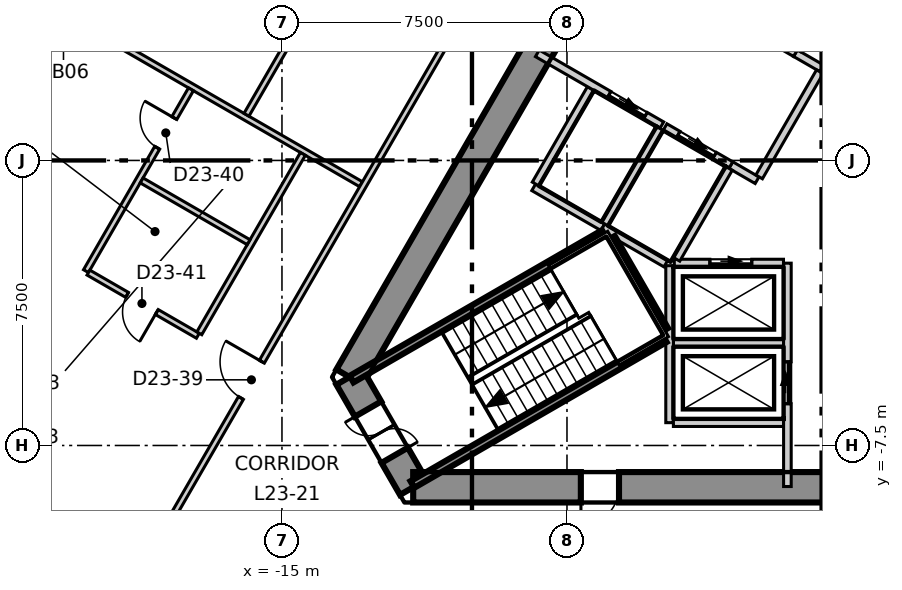
"""IFC4 building model, lengths in metres.
Left out: names, types, materials, properties, quantities, classifications, styles, units other than length and angle.
Written with IfcOpenShell. Run it as: python <this file> out.ifc"""

import sys

from ifc_helpers import new_model, si_unit, direction, frame, frame_2d, origin, place, context, subcontext, project, spatial, polyline, rectangle, outline, extrude, element, fill, save


model = new_model("IFC4")
c1 = context("Model", 3, precision=1e-05, world=origin(), true_north=direction((0.0, 1.0)))
c2 = subcontext(c1, "Body", "Model", "MODEL_VIEW")
j1 = project(units=[si_unit("LENGTHUNIT", "METRE"), si_unit("PLANEANGLEUNIT", "RADIAN")], contexts=[c1])
p1 = place(None, origin())
s1 = spatial("IfcSite", under=j1, at=p1, CompositionType="ELEMENT")
p2 = place(p1, origin())
s2 = spatial("IfcBuilding", under=s1, at=p2, CompositionType="ELEMENT")
p3 = place(p2, frame((0.0, 0.0, 104.3)))
s3 = spatial("IfcBuildingStorey", under=s2, at=p3, CompositionType="ELEMENT", Elevation=104.3)
p4 = place(p3, frame((-1.674, 14.3, -0.3), z_axis=(0.0, 0.0, 1.0), x_axis=(-0.499995765644, -0.866027848477, 0.0)))
e1 = element("IfcWall", 1, at=p4, inside=s3, PredefinedType="SHEAR", context=c2, shape_type="SweptSolid", body=[
    extrude(outline(polyline([(-0.231, -0.4), (1.732, -0.4), (3.695, -0.4), (5.658, -0.4), (7.621, -0.4), (9.584, -0.4), (11.547, -0.4), (13.51, -0.4), (15.473, -0.4), (17.436, -0.4), (19.399, -0.4), (21.362, -0.4), (23.325, -0.4), (22.863, 0.4), (20.977, 0.4), (19.091, 0.4), (17.205, 0.4), (15.319, 0.4), (13.433, 0.4), (11.547, 0.4), (9.661, 0.4), (7.775, 0.4), (5.889, 0.4), (4.003, 0.4), (2.117, 0.4), (0.231, 0.4), (-0.231, -0.4)])), origin(), (0.0, 0.0, 1.0), 4.0),
])
p5 = place(p4, frame((10.997, 0.0, 0.3)))
e2 = element("IfcOpeningElement", 2, at=p5, cuts=e1, PredefinedType="OPENING", context=c2, shape_type="SweptSolid", body=[
    extrude(rectangle(XDim=1.1, YDim=2.1, at=frame_2d((0.55, 1.05))), frame((0.0, 0.41, 0.0), z_axis=(0.0, -1.0, 0.0), x_axis=(1.0, 0.0, 0.0)), (0.0, 0.0, 1.0), 0.82),
])
p6 = place(p4, frame((4.474, 0.0, 0.3)))
e3 = element("IfcOpeningElement", 3, at=p6, cuts=e1, PredefinedType="OPENING", context=c2, shape_type="SweptSolid", body=[
    extrude(rectangle(XDim=0.9, YDim=2.1, at=frame_2d((0.45, 1.05))), frame((0.0, 0.41, 0.0), z_axis=(0.0, -1.0, 0.0), x_axis=(1.0, 0.0, 0.0)), (0.0, 0.0, 1.0), 0.82),
])
p7 = place(p3, frame((-13.221, -5.7, -0.3), z_axis=(0.0, 0.0, 1.0), x_axis=(0.49987182685, -0.866099391942, 0.0)))
e4 = element("IfcWall", 4, at=p7, inside=s3, PredefinedType="SHEAR", context=c2, shape_type="SweptSolid", body=[
    extrude(outline(polyline([(-0.231, -0.4), (1.674, -0.4), (3.579, -0.4), (3.118, 0.4), (1.674, 0.4), (0.231, 0.4), (-0.231, -0.4)])), origin(), (0.0, 0.0, 1.0), 4.0),
])
p8 = place(p7, frame((0.974, 0.0, 0.3)))
e5 = element("IfcOpeningElement", 5, at=p8, cuts=e4, PredefinedType="OPENING", context=c2, shape_type="SweptSolid", body=[
    extrude(rectangle(XDim=1.4, YDim=2.1, at=frame_2d((0.7, 1.05))), frame((0.0, 0.41, 0.0), z_axis=(0.0, -1.0, 0.0), x_axis=(1.0, 0.0, 0.0)), (0.0, 0.0, 1.0), 0.82),
])
p9 = place(p3, frame((-11.547, -8.6, -0.3), z_axis=(0.0, 0.0, 1.0), x_axis=(1.0, 0.0, 0.0)))
e6 = element("IfcWall", 6, at=p9, inside=s3, PredefinedType="SHEAR", context=c2, shape_type="SweptSolid", body=[
    extrude(outline(polyline([(-0.231, -0.4), (1.732, -0.4), (3.695, -0.4), (5.658, -0.4), (7.621, -0.4), (9.584, -0.4), (11.547, -0.4), (13.51, -0.4), (15.473, -0.4), (17.436, -0.4), (19.399, -0.4), (21.362, -0.4), (23.325, -0.4), (22.863, 0.4), (20.977, 0.4), (19.091, 0.4), (17.205, 0.4), (15.319, 0.4), (13.433, 0.4), (11.547, 0.4), (9.661, 0.4), (7.775, 0.4), (5.889, 0.4), (4.003, 0.4), (2.117, 0.4), (0.231, 0.4), (-0.231, -0.4)])), origin(), (0.0, 0.0, 1.0), 4.0),
])
p10 = place(p9, frame((4.414, 0.0, 0.3)))
e7 = element("IfcOpeningElement", 7, at=p10, cuts=e6, PredefinedType="OPENING", context=c2, shape_type="SweptSolid", body=[
    extrude(rectangle(XDim=1.0, YDim=2.1, at=frame_2d((0.5, 1.05))), frame((0.0, 0.41, 0.0), z_axis=(0.0, -1.0, 0.0), x_axis=(1.0, 0.0, 0.0)), (0.0, 0.0, 1.0), 0.82),
])
p11 = place(p3, frame((-3.2, 35.691, 0.0), z_axis=(0.0, 0.0, 1.0), x_axis=(-0.500010127185, -0.866019556773, 0.0)))
e8 = element("IfcWall", 8, at=p11, inside=s3, PredefinedType="ELEMENTEDWALL", context=c2, shape_type="SweptSolid", body=[
    extrude(rectangle(XDim=58.599, YDim=0.2, at=frame_2d((29.299, 0.0))), origin(), (0.0, 0.0, 1.0), 3.7),
])
p12 = place(p11, frame((2.353, 0.0, 0.9)))
e9 = element("IfcOpeningElement", 9, at=p12, cuts=e8, PredefinedType="OPENING", context=c2, shape_type="SweptSolid", body=[
    extrude(rectangle(XDim=4.9, YDim=2.5, at=frame_2d((2.45, 1.25))), frame((0.0, 0.11, 0.0), z_axis=(0.0, -1.0, 0.0), x_axis=(1.0, 0.0, 0.0)), (0.0, 0.0, 1.0), 0.22),
])
p13 = place(p11, frame((9.355, 0.0, 0.9)))
e10 = element("IfcOpeningElement", 10, at=p13, cuts=e8, PredefinedType="OPENING", context=c2, shape_type="SweptSolid", body=[
    extrude(rectangle(XDim=4.9, YDim=2.5, at=frame_2d((2.45, 1.25))), frame((0.0, 0.11, 0.0), z_axis=(0.0, -1.0, 0.0), x_axis=(1.0, 0.0, 0.0)), (0.0, 0.0, 1.0), 0.22),
])
p14 = place(p11, frame((16.357, 0.0, 0.9)))
e11 = element("IfcOpeningElement", 11, at=p14, cuts=e8, PredefinedType="OPENING", context=c2, shape_type="SweptSolid", body=[
    extrude(rectangle(XDim=4.9, YDim=2.5, at=frame_2d((2.45, 1.25))), frame((0.0, 0.11, 0.0), z_axis=(0.0, -1.0, 0.0), x_axis=(1.0, 0.0, 0.0)), (0.0, 0.0, 1.0), 0.22),
])
p15 = place(p11, frame((23.358, 0.0, 0.9)))
e12 = element("IfcOpeningElement", 12, at=p15, cuts=e8, PredefinedType="OPENING", context=c2, shape_type="SweptSolid", body=[
    extrude(rectangle(XDim=4.9, YDim=2.5, at=frame_2d((2.45, 1.25))), frame((0.0, 0.11, 0.0), z_axis=(0.0, -1.0, 0.0), x_axis=(1.0, 0.0, 0.0)), (0.0, 0.0, 1.0), 0.22),
])
p16 = place(p11, frame((30.36, 0.0, 0.9)))
e13 = element("IfcOpeningElement", 13, at=p16, cuts=e8, PredefinedType="OPENING", context=c2, shape_type="SweptSolid", body=[
    extrude(rectangle(XDim=4.9, YDim=2.5, at=frame_2d((2.45, 1.25))), frame((0.0, 0.11, 0.0), z_axis=(0.0, -1.0, 0.0), x_axis=(1.0, 0.0, 0.0)), (0.0, 0.0, 1.0), 0.22),
])
p17 = place(p11, frame((37.362, 0.0, 0.9)))
e14 = element("IfcOpeningElement", 14, at=p17, cuts=e8, PredefinedType="OPENING", context=c2, shape_type="SweptSolid", body=[
    extrude(rectangle(XDim=4.9, YDim=2.5, at=frame_2d((2.45, 1.25))), frame((0.0, 0.11, 0.0), z_axis=(0.0, -1.0, 0.0), x_axis=(1.0, 0.0, 0.0)), (0.0, 0.0, 1.0), 0.22),
])
p18 = place(p11, frame((44.363, 0.0, 0.9)))
e15 = element("IfcOpeningElement", 15, at=p18, cuts=e8, PredefinedType="OPENING", context=c2, shape_type="SweptSolid", body=[
    extrude(rectangle(XDim=4.9, YDim=2.5, at=frame_2d((2.45, 1.25))), frame((0.0, 0.11, 0.0), z_axis=(0.0, -1.0, 0.0), x_axis=(1.0, 0.0, 0.0)), (0.0, 0.0, 1.0), 0.22),
])
p19 = place(p11, frame((51.365, 0.0, 0.9)))
e16 = element("IfcOpeningElement", 16, at=p19, cuts=e8, PredefinedType="OPENING", context=c2, shape_type="SweptSolid", body=[
    extrude(rectangle(XDim=4.9, YDim=2.5, at=frame_2d((2.45, 1.25))), frame((0.0, 0.11, 0.0), z_axis=(0.0, -1.0, 0.0), x_axis=(1.0, 0.0, 0.0)), (0.0, 0.0, 1.0), 0.22),
])
p20 = place(p3, frame((-21.286, 4.205, 0.0), z_axis=(0.0, 0.0, 1.0), x_axis=(0.866007579589, -0.500030871142, 0.0)))
e17 = element("IfcWall", 17, at=p20, inside=s3, PredefinedType="PARTITIONING", context=c2, shape_type="SweptSolid", body=[
    extrude(rectangle(XDim=9.662, YDim=0.15, at=frame_2d((4.831, 0.0))), origin(), (0.0, 0.0, 1.0), 3.7),
])
p21 = place(p3, frame((-18.631, -10.669, 0.0), z_axis=(0.0, 0.0, 1.0), x_axis=(0.500015596868, 0.866016398741, 0.0)))
e18 = element("IfcWall", 18, at=p21, inside=s3, PredefinedType="PARTITIONING", context=c2, shape_type="SweptSolid", body=[
    extrude(rectangle(XDim=24.656, YDim=0.15, at=frame_2d((12.328, 0.0))), origin(), (0.0, 0.0, 1.0), 3.7),
])
p22 = place(p21, frame((17.507, 0.0, 0.0)))
e19 = element("IfcOpeningElement", 19, at=p22, cuts=e18, PredefinedType="OPENING", context=c2, shape_type="SweptSolid", body=[
    extrude(rectangle(XDim=1.1, YDim=2.1, at=frame_2d((0.55, 1.05))), frame((0.0, 0.085, 0.0), z_axis=(0.0, -1.0, 0.0), x_axis=(1.0, 0.0, 0.0)), (0.0, 0.0, 1.0), 0.17),
])
p23 = place(p21, frame((5.104, 0.0, 0.0)))
e20 = element("IfcOpeningElement", 20, at=p23, cuts=e18, PredefinedType="OPENING", context=c2, shape_type="SweptSolid", body=[
    extrude(rectangle(XDim=1.1, YDim=2.1, at=frame_2d((0.55, 1.05))), frame((0.0, 0.085, 0.0), z_axis=(0.0, -1.0, 0.0), x_axis=(1.0, 0.0, 0.0)), (0.0, 0.0, 1.0), 0.17),
])
p24 = place(p3, frame((-20.157, -2.913, 0.0), z_axis=(0.0, 0.0, 1.0), x_axis=(0.499898410332, 0.866084048662, 0.0)))
e21 = element("IfcWall", 21, at=p24, inside=s3, PredefinedType="PARTITIONING", context=c2, shape_type="SweptSolid", body=[
    extrude(rectangle(XDim=5.525, YDim=0.15, at=frame_2d((2.763, 0.0))), origin(), (0.0, 0.0, 1.0), 3.7),
])
p25 = place(p24, frame((3.75, 0.0, 0.0)))
e22 = element("IfcOpeningElement", 22, at=p25, cuts=e21, PredefinedType="OPENING", context=c2, shape_type="SweptSolid", body=[
    extrude(rectangle(XDim=0.9, YDim=2.1, at=frame_2d((0.45, 1.05))), frame((0.0, 0.085, 0.0), z_axis=(0.0, -1.0, 0.0), x_axis=(1.0, 0.0, 0.0)), (0.0, 0.0, 1.0), 0.17),
])
p26 = place(p3, frame((-20.092, -2.951, 0.0), z_axis=(0.0, 0.0, 1.0), x_axis=(0.866047399325, -0.49996190067, 0.0)))
e23 = element("IfcWall", 23, at=p26, inside=s3, PredefinedType="PARTITIONING", context=c2, shape_type="SweptSolid", body=[
    extrude(rectangle(XDim=3.324, YDim=0.15, at=frame_2d((1.662, 0.0))), origin(), (0.0, 0.0, 1.0), 3.7),
])
p27 = place(p26, frame((1.175, 0.0, 0.0)))
e24 = element("IfcOpeningElement", 24, at=p27, cuts=e23, PredefinedType="OPENING", context=c2, shape_type="SweptSolid", body=[
    extrude(rectangle(XDim=0.9, YDim=2.1, at=frame_2d((0.45, 1.05))), frame((0.0, 0.085, 0.0), z_axis=(0.0, -1.0, 0.0), x_axis=(1.0, 0.0, 0.0)), (0.0, 0.0, 1.0), 0.17),
])
p28 = place(p3, frame((-17.175, -4.548, 0.0), z_axis=(0.0, 0.0, 1.0), x_axis=(0.499983534837, 0.866034909742, 0.0)))
e25 = element("IfcWall", 25, at=p28, inside=s3, PredefinedType="PARTITIONING", context=c2, shape_type="SweptSolid", body=[
    extrude(rectangle(XDim=5.45, YDim=0.15, at=frame_2d((2.725, 0.0))), origin(), (0.0, 0.0, 1.0), 3.7),
])
p29 = place(p3, frame((-18.692, -0.526, 0.0), z_axis=(0.0, 0.0, 1.0), x_axis=(0.865977875238, -0.500082312822, 0.0)))
e26 = element("IfcWall", 26, at=p29, inside=s3, PredefinedType="PARTITIONING", context=c2, shape_type="SweptSolid", body=[
    extrude(rectangle(XDim=3.25, YDim=0.15, at=frame_2d((1.625, 0.0))), origin(), (0.0, 0.0, 1.0), 3.7),
])
p30 = place(p3, frame((-15.934, 1.202, 0.0), z_axis=(0.0, 0.0, 1.0), x_axis=(0.499994937304, 0.866028326714, 0.0)))
e27 = element("IfcWall", 27, at=p30, inside=s3, PredefinedType="PARTITIONING", context=c2, shape_type="SweptSolid", body=[
    extrude(rectangle(XDim=12.952, YDim=0.15, at=frame_2d((6.476, 0.0))), origin(), (0.0, 0.0, 1.0), 3.7),
])
p31 = place(p30, frame((5.977, 0.0, 0.0)))
e28 = element("IfcOpeningElement", 28, at=p31, cuts=e27, PredefinedType="OPENING", context=c2, shape_type="SweptSolid", body=[
    extrude(rectangle(XDim=1.0, YDim=2.1, at=frame_2d((0.5, 1.05))), frame((0.0, 0.085, 0.0), z_axis=(0.0, -1.0, 0.0), x_axis=(1.0, 0.0, 0.0)), (0.0, 0.0, 1.0), 0.17),
])
p32 = place(p3, frame((-8.376, -0.707, 0.0), z_axis=(0.0, 0.0, 1.0), x_axis=(0.866067520717, -0.499927044236, 0.0)))
e29 = element("IfcWall", 29, at=p32, inside=s3, PredefinedType="SOLIDWALL", context=c2, shape_type="SweptSolid", body=[
    extrude(rectangle(XDim=2.1, YDim=0.2, at=frame_2d((1.05, 0.0))), origin(), (0.0, 0.0, 1.0), 3.7),
])
p33 = place(p3, frame((-8.326, -0.62, 0.0), z_axis=(0.0, 0.0, 1.0), x_axis=(0.500023687443, 0.866011727401, 0.0)))
e30 = element("IfcWall", 30, at=p33, inside=s3, PredefinedType="SOLIDWALL", context=c2, shape_type="SweptSolid", body=[
    extrude(rectangle(XDim=2.9, YDim=0.2, at=frame_2d((1.45, 0.0))), origin(), (0.0, 0.0, 1.0), 3.7),
])
p34 = place(p3, frame((-4.7, -4.8, 0.0), z_axis=(0.0, 0.0, 1.0), x_axis=(1.0, 0.0, 0.0)))
e31 = element("IfcWall", 31, at=p34, inside=s3, PredefinedType="SOLIDWALL", context=c2, shape_type="SweptSolid", body=[
    extrude(rectangle(XDim=2.9, YDim=0.2, at=frame_2d((1.45, 0.0))), origin(), (0.0, 0.0, 1.0), 3.7),
])
p35 = place(p3, frame((-4.8, -6.9, 0.0), z_axis=(0.0, 0.0, 1.0), x_axis=(0.0, 1.0, 0.0)))
e32 = element("IfcWall", 32, at=p35, inside=s3, PredefinedType="SOLIDWALL", context=c2, shape_type="SweptSolid", body=[
    extrude(rectangle(XDim=4.131, YDim=0.2, at=frame_2d((2.065, 0.0))), origin(), (0.0, 0.0, 1.0), 3.7),
])
p36 = place(p3, frame((-4.7, -6.9, 0.0), z_axis=(0.0, 0.0, 1.0), x_axis=(1.0, 0.0, 0.0)))
e33 = element("IfcWall", 33, at=p36, inside=s3, PredefinedType="SOLIDWALL", context=c2, shape_type="SweptSolid", body=[
    extrude(rectangle(XDim=2.9, YDim=0.2, at=frame_2d((1.45, 0.0))), origin(), (0.0, 0.0, 1.0), 3.7),
])
p37 = place(p3, frame((-1.7, -8.58, 0.0), z_axis=(0.0, 0.0, 1.0), x_axis=(0.0, 1.0, 0.0)))
e34 = element("IfcWall", 34, at=p37, inside=s3, PredefinedType="SOLIDWALL", context=c2, shape_type="SweptSolid", body=[
    extrude(rectangle(XDim=5.877, YDim=0.2, at=frame_2d((2.938, 0.0))), origin(), (0.0, 0.0, 1.0), 3.7),
])
p38 = place(p37, frame((2.18, 0.0, 0.0)))
e35 = element("IfcOpeningElement", 35, at=p38, cuts=e34, PredefinedType="OPENING", context=c2, shape_type="SweptSolid", body=[
    extrude(rectangle(XDim=1.1, YDim=2.1, at=frame_2d((0.55, 1.05))), frame((0.0, 0.11, 0.0), z_axis=(0.0, -1.0, 0.0), x_axis=(1.0, 0.0, 0.0)), (0.0, 0.0, 1.0), 0.22),
])
p39 = place(p3, frame((-4.676, -2.7, 0.0), z_axis=(0.0, 0.0, 1.0), x_axis=(1.0, 0.0, 0.0)))
e36 = element("IfcWall", 36, at=p39, inside=s3, PredefinedType="SOLIDWALL", context=c2, shape_type="SweptSolid", body=[
    extrude(rectangle(XDim=2.873, YDim=0.2, at=frame_2d((1.437, 0.0))), origin(), (0.0, 0.0, 1.0), 3.7),
])
p40 = place(p39, frame((0.937, 0.0, 0.0)))
e37 = element("IfcOpeningElement", 37, at=p40, cuts=e36, PredefinedType="OPENING", context=c2, shape_type="SweptSolid", body=[
    extrude(rectangle(XDim=1.1, YDim=2.1, at=frame_2d((0.55, 1.05))), frame((0.0, 0.11, 0.0), z_axis=(0.0, -1.0, 0.0), x_axis=(1.0, 0.0, 0.0)), (0.0, 0.0, 1.0), 0.22),
])
p41 = place(p3, frame((-8.28, 2.818, 0.0), z_axis=(0.0, 0.0, 1.0), x_axis=(0.86600175068, -0.50004096614, 0.0)))
e38 = element("IfcWall", 38, at=p41, inside=s3, PredefinedType="SOLIDWALL", context=c2, shape_type="SweptSolid", body=[
    extrude(rectangle(XDim=3.782, YDim=0.2, at=frame_2d((1.891, 0.0))), origin(), (0.0, 0.0, 1.0), 3.7),
])
p42 = place(p41, frame((2.18, 0.0, 0.0)))
e39 = element("IfcOpeningElement", 39, at=p42, cuts=e38, PredefinedType="OPENING", context=c2, shape_type="SweptSolid", body=[
    extrude(rectangle(XDim=1.1, YDim=2.1, at=frame_2d((0.55, 1.05))), frame((0.0, 0.11, 0.0), z_axis=(0.0, -1.0, 0.0), x_axis=(1.0, 0.0, 0.0)), (0.0, 0.0, 1.0), 0.22),
])
p43 = place(p3, frame((-3.188, -0.122, 0.0), z_axis=(0.0, 0.0, 1.0), x_axis=(0.865705793592, -0.50055317294, 0.0)))
e40 = element("IfcWall", 40, at=p43, inside=s3, PredefinedType="SOLIDWALL", context=c2, shape_type="SweptSolid", body=[
    extrude(rectangle(XDim=0.797, YDim=0.2, at=frame_2d((0.398, 0.0))), origin(), (0.0, 0.0, 1.0), 3.7),
])
p44 = place(p3, frame((-1.488, 2.822, 0.0), z_axis=(0.0, 0.0, 1.0), x_axis=(0.866236612152, -0.499633997809, 0.0)))
e41 = element("IfcWall", 41, at=p44, inside=s3, PredefinedType="SOLIDWALL", context=c2, shape_type="SweptSolid", body=[
    extrude(rectangle(XDim=0.796, YDim=0.2, at=frame_2d((0.398, 0.0))), origin(), (0.0, 0.0, 1.0), 3.7),
])
p45 = place(p3, frame((-2.444, -0.433, 0.0), z_axis=(0.0, 0.0, 1.0), x_axis=(0.500035624827, 0.866004834804, 0.0)))
e42 = element("IfcWall", 42, at=p45, inside=s3, PredefinedType="SOLIDWALL", context=c2, shape_type="SweptSolid", body=[
    extrude(rectangle(XDim=3.194, YDim=0.2, at=frame_2d((1.597, 0.0))), origin(), (0.0, 0.0, 1.0), 3.7),
])
p46 = place(p3, frame((-6.557, -1.757, 0.0), z_axis=(0.0, 0.0, 1.0), x_axis=(0.8659754619, -0.500086491905, 0.0)))
e43 = element("IfcWall", 43, at=p46, inside=s3, PredefinedType="SOLIDWALL", context=c2, shape_type="SweptSolid", body=[
    extrude(rectangle(XDim=1.916, YDim=0.2, at=frame_2d((0.958, 0.0))), origin(), (0.0, 0.0, 1.0), 3.7),
])
p47 = place(p3, frame((-6.507, -1.67, 0.0), z_axis=(0.0, 0.0, 1.0), x_axis=(0.50012328804, 0.865954211699, 0.0)))
e44 = element("IfcWall", 44, at=p47, inside=s3, PredefinedType="SOLIDWALL", context=c2, shape_type="SweptSolid", body=[
    extrude(rectangle(XDim=2.9, YDim=0.2, at=frame_2d((1.45, 0.0))), origin(), (0.0, 0.0, 1.0), 3.7),
])
p48 = place(p3, frame((-4.92, 0.878, 0.0), z_axis=(0.0, 0.0, 1.0), x_axis=(0.866010750942, -0.50002537861, 0.0)))
e45 = element("IfcWall", 45, at=p48, inside=s3, PredefinedType="SOLIDWALL", context=c2, shape_type="SweptSolid", body=[
    extrude(rectangle(XDim=2.0, YDim=0.2, at=frame_2d((1.0, 0.0))), origin(), (0.0, 0.0, 1.0), 3.7),
])
p49 = place(p48, frame((0.4, 0.0, 0.0)))
e46 = element("IfcOpeningElement", 46, at=p49, cuts=e45, PredefinedType="OPENING", context=c2, shape_type="SweptSolid", body=[
    extrude(rectangle(XDim=1.1, YDim=2.1, at=frame_2d((0.55, 1.05))), frame((0.0, 0.11, 0.0), z_axis=(0.0, -1.0, 0.0), x_axis=(1.0, 0.0, 0.0)), (0.0, 0.0, 1.0), 0.22),
])
p50 = place(p3, frame((-4.619, -2.6, 0.0), z_axis=(0.0, 0.0, 1.0), x_axis=(0.50009492287, 0.865970593103, 0.0)))
e47 = element("IfcWall", 47, at=p50, inside=s3, PredefinedType="SOLIDWALL", context=c2, shape_type="SweptSolid", body=[
    extrude(rectangle(XDim=2.761, YDim=0.2, at=frame_2d((1.381, 0.0))), origin(), (0.0, 0.0, 1.0), 3.7),
])
p51 = place(p3, frame((-3.309, 3.873, 0.0), z_axis=(0.0, 0.0, 1.0), x_axis=(0.866098583652, -0.499873227325, 0.0)))
e48 = element("IfcWall", 48, at=p51, inside=s3, PredefinedType="SOLIDWALL", context=c2, shape_type="SweptSolid", body=[
    extrude(rectangle(XDim=2.103, YDim=0.2, at=frame_2d((1.051, 0.0))), origin(), (0.0, 0.0, 1.0), 3.7),
])
p52 = place(p51, frame((0.502, 0.0, 0.0)))
e49 = element("IfcOpeningElement", 49, at=p52, cuts=e48, PredefinedType="OPENING", context=c2, shape_type="SweptSolid", body=[
    extrude(rectangle(XDim=1.1, YDim=2.1, at=frame_2d((0.55, 1.05))), frame((0.0, 0.11, 0.0), z_axis=(0.0, -1.0, 0.0), x_axis=(1.0, 0.0, 0.0)), (0.0, 0.0, 1.0), 0.22),
])
p53 = place(p3, frame((-13.167, -5.754, 0.0), z_axis=(0.0, 0.0, 1.0), x_axis=(0.866060938598, 0.499938446846, 0.0)))
e50 = element("IfcWall", 50, at=p53, inside=s3, PredefinedType="SOLIDWALL", context=c2, shape_type="SweptSolid", body=[
    extrude(rectangle(XDim=7.665, YDim=0.2, at=frame_2d((3.832, 0.0))), origin(), (0.0, 0.0, 1.0), 3.7),
])
p54 = place(p3, frame((-6.329, -2.038, 0.0), z_axis=(0.0, 0.0, 1.0), x_axis=(0.500200581029, -0.865909567298, 0.0)))
e51 = element("IfcWall", 51, at=p54, inside=s3, PredefinedType="SOLIDWALL", context=c2, shape_type="SweptSolid", body=[
    extrude(rectangle(XDim=2.799, YDim=0.2, at=frame_2d((1.399, 0.0))), origin(), (0.0, 0.0, 1.0), 3.7),
])
p55 = place(p3, frame((-11.567, -8.526, 0.0), z_axis=(0.0, 0.0, 1.0), x_axis=(0.866005769735, 0.50003400563, 0.0)))
e52 = element("IfcWall", 52, at=p55, inside=s3, PredefinedType="SOLIDWALL", context=c2, shape_type="SweptSolid", body=[
    extrude(rectangle(XDim=7.665, YDim=0.2, at=frame_2d((3.833, 0.0))), origin(), (0.0, 0.0, 1.0), 3.7),
])
p56 = place(p40, origin())
e53 = element("IfcDoor", 53, at=p56, inside=s3, OperationType="SLIDING_TO_LEFT", PredefinedType="DOOR", context=c2, shape_type="SweptSolid", body=[
    extrude(rectangle(XDim=1.1, YDim=2.1, at=frame_2d((0.55, 1.05))), frame((0.0, 0.025, 0.0), z_axis=(0.0, -1.0, 0.0), x_axis=(1.0, 0.0, 0.0)), (0.0, 0.0, 1.0), 0.05),
])
fill(e37, e53)
p57 = place(p38, origin())
e54 = element("IfcDoor", 54, at=p57, inside=s3, OperationType="SLIDING_TO_LEFT", PredefinedType="DOOR", context=c2, shape_type="SweptSolid", body=[
    extrude(rectangle(XDim=1.1, YDim=2.1, at=frame_2d((0.55, 1.05))), frame((0.0, 0.025, 0.0), z_axis=(0.0, -1.0, 0.0), x_axis=(1.0, 0.0, 0.0)), (0.0, 0.0, 1.0), 0.05),
])
fill(e35, e54)
p58 = place(p49, origin())
e55 = element("IfcDoor", 55, at=p58, inside=s3, OperationType="SLIDING_TO_LEFT", PredefinedType="DOOR", context=c2, shape_type="SweptSolid", body=[
    extrude(rectangle(XDim=1.1, YDim=2.1, at=frame_2d((0.55, 1.05))), frame((0.0, 0.025, 0.0), z_axis=(0.0, -1.0, 0.0), x_axis=(1.0, 0.0, 0.0)), (0.0, 0.0, 1.0), 0.05),
])
fill(e46, e55)
p59 = place(p42, origin())
e56 = element("IfcDoor", 56, at=p59, inside=s3, OperationType="SLIDING_TO_LEFT", PredefinedType="DOOR", context=c2, shape_type="SweptSolid", body=[
    extrude(rectangle(XDim=1.1, YDim=2.1, at=frame_2d((0.55, 1.05))), frame((0.0, 0.025, 0.0), z_axis=(0.0, -1.0, 0.0), x_axis=(1.0, 0.0, 0.0)), (0.0, 0.0, 1.0), 0.05),
])
fill(e39, e56)
p60 = place(p23, origin())
e57 = element("IfcDoor", 57, at=p60, inside=s3, OperationType="SINGLE_SWING_LEFT", PredefinedType="DOOR", context=c2, shape_type="SweptSolid", body=[
    extrude(rectangle(XDim=1.1, YDim=2.1, at=frame_2d((0.55, 1.05))), frame((0.0, 0.025, 0.0), z_axis=(0.0, -1.0, 0.0), x_axis=(1.0, 0.0, 0.0)), (0.0, 0.0, 1.0), 0.05),
])
fill(e20, e57)
p61 = place(p25, origin())
e58 = element("IfcDoor", 58, at=p61, inside=s3, OperationType="SINGLE_SWING_LEFT", PredefinedType="DOOR", context=c2, shape_type="SweptSolid", body=[
    extrude(rectangle(XDim=0.9, YDim=2.1, at=frame_2d((0.45, 1.05))), frame((0.0, 0.025, 0.0), z_axis=(0.0, -1.0, 0.0), x_axis=(1.0, 0.0, 0.0)), (0.0, 0.0, 1.0), 0.05),
])
fill(e22, e58)
p62 = place(p27, origin())
e59 = element("IfcDoor", 59, at=p62, inside=s3, OperationType="SINGLE_SWING_RIGHT", PredefinedType="DOOR", context=c2, shape_type="SweptSolid", body=[
    extrude(rectangle(XDim=0.9, YDim=2.1, at=frame_2d((0.45, 1.05))), frame((0.0, 0.025, 0.0), z_axis=(0.0, -1.0, 0.0), x_axis=(1.0, 0.0, 0.0)), (0.0, 0.0, 1.0), 0.05),
])
fill(e24, e59)
p63 = place(p8, origin())
e60 = element("IfcDoor", 60, at=p63, inside=s3, OperationType="DOUBLE_DOOR_SINGLE_SWING", PredefinedType="DOOR", context=c2, shape_type="SweptSolid", body=[
    extrude(rectangle(XDim=1.4, YDim=2.1, at=frame_2d((0.7, 1.05))), frame((0.0, 0.025, 0.0), z_axis=(0.0, -1.0, 0.0), x_axis=(1.0, 0.0, 0.0)), (0.0, 0.0, 1.0), 0.05),
])
fill(e5, e60)
p64 = place(p10, origin())
e61 = element("IfcDoor", 61, at=p64, inside=s3, OperationType="SINGLE_SWING_LEFT", PredefinedType="DOOR", context=c2, shape_type="SweptSolid", body=[
    extrude(rectangle(XDim=1.0, YDim=2.1, at=frame_2d((0.5, 1.05))), frame((0.0, 0.125, 0.0), z_axis=(0.0, -1.0, 0.0), x_axis=(1.0, 0.0, 0.0)), (0.0, 0.0, 1.0), 0.05),
])
fill(e7, e61)
save(model, sys.argv[1])
